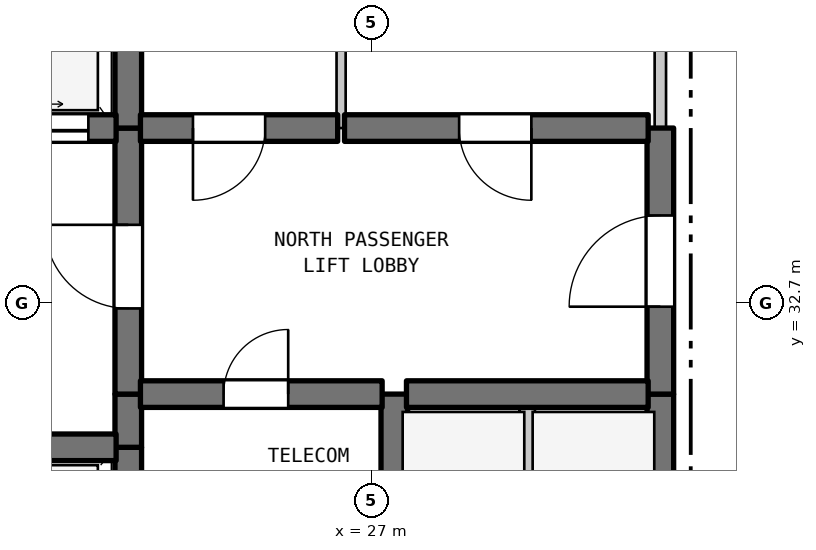
"""IFC4 building model, lengths in metres.
Left out: names, types, materials, properties, quantities, classifications, styles, units other than length and angle.
Written with IfcOpenShell. Run it as: python <this file> out.ifc"""

import sys

from ifc_helpers import new_model, si_unit, direction, frame, frame_2d, origin, place, context, subcontext, project, spatial, rectangle, extrude, element, fill, save


model = new_model("IFC4")
c1 = context("Model", 3, precision=1e-05, world=origin(), true_north=direction((0.0, 1.0)))
c2 = subcontext(c1, "Body", "Model", "MODEL_VIEW")
j1 = project(units=[si_unit("LENGTHUNIT", "METRE"), si_unit("PLANEANGLEUNIT", "RADIAN")], contexts=[c1])
p1 = place(None, origin())
s1 = spatial("IfcSite", under=j1, at=p1, CompositionType="ELEMENT")
p2 = place(p1, origin())
s2 = spatial("IfcBuilding", under=s1, at=p2, CompositionType="ELEMENT")
p3 = place(p2, frame((0.0, 0.0, 206.9)))
s3 = spatial("IfcBuildingStorey", under=s2, at=p3, CompositionType="ELEMENT", Elevation=206.9)
p4 = place(p3, frame((23.8, 29.5, 0.0), z_axis=(0.0, 0.0, 1.0), x_axis=(0.0, 1.0, 0.0)))
e1 = element("IfcWall", 1, at=p4, inside=s3, PredefinedType="SHEAR", context=c2, shape_type="SweptSolid", body=[
    extrude(rectangle(XDim=1.3, YDim=0.35, at=frame_2d((0.65, 0.0))), origin(), (0.0, 0.0, 1.0), 3.39),
])
p5 = place(p3, frame((23.8, 30.8, 0.0), z_axis=(0.0, 0.0, 1.0), x_axis=(0.0, 1.0, 0.0)))
e2 = element("IfcWall", 2, at=p5, inside=s3, PredefinedType="SHEAR", context=c2, shape_type="SweptSolid", body=[
    extrude(rectangle(XDim=0.7, YDim=0.35, at=frame_2d((0.35, 0.0))), origin(), (0.0, 0.0, 1.0), 3.39),
])
p6 = place(p3, frame((23.8, 31.5, 0.0), z_axis=(0.0, 0.0, 1.0), x_axis=(0.0, 1.0, 0.0)))
e3 = element("IfcWall", 3, at=p6, inside=s3, PredefinedType="SHEAR", context=c2, shape_type="SweptSolid", body=[
    extrude(rectangle(XDim=3.5, YDim=0.35, at=frame_2d((1.75, 0.0))), origin(), (0.0, 0.0, 1.0), 3.39),
])
p7 = place(p6, frame((1.127, 0.0, 0.0)))
e4 = element("IfcOpeningElement", 4, at=p7, cuts=e3, PredefinedType="OPENING", context=c2, shape_type="SweptSolid", body=[
    extrude(rectangle(XDim=1.1, YDim=2.15, at=frame_2d((0.55, 1.075))), frame((0.0, 0.185, 0.0), z_axis=(0.0, -1.0, 0.0), x_axis=(1.0, 0.0, 0.0)), (0.0, 0.0, 1.0), 0.37),
])
p8 = place(p3, frame((23.8, 35.0, 0.0), z_axis=(0.0, 0.0, 1.0), x_axis=(0.0, 1.0, 0.0)))
e5 = element("IfcWall", 5, at=p8, inside=s3, PredefinedType="SHEAR", context=c2, shape_type="SweptSolid", body=[
    extrude(rectangle(XDim=2.9, YDim=0.35, at=frame_2d((1.45, 0.0))), origin(), (0.0, 0.0, 1.0), 3.39),
])
p9 = place(p3, frame((26.6, 35.0, 0.0), z_axis=(0.0, 0.0, 1.0), x_axis=(0.0, 1.0, 0.0)))
e6 = element("IfcWall", 6, at=p9, inside=s3, PredefinedType="PARTITIONING", context=c2, shape_type="SweptSolid", body=[
    extrude(rectangle(XDim=2.9, YDim=0.12, at=frame_2d((1.45, 0.0))), origin(), (0.0, 0.0, 1.0), 3.39),
])
p10 = place(p3, frame((27.3, 29.5, 0.0), z_axis=(0.0, 0.0, 1.0), x_axis=(0.0, 1.0, 0.0)))
e7 = element("IfcWall", 7, at=p10, inside=s3, PredefinedType="SHEAR", context=c2, shape_type="SweptSolid", body=[
    extrude(rectangle(XDim=2.0, YDim=0.35, at=frame_2d((1.0, 0.0))), origin(), (0.0, 0.0, 1.0), 3.39),
])
p11 = place(p3, frame((29.05, 28.9, 0.0), z_axis=(0.0, 0.0, 1.0), x_axis=(0.0, 1.0, 0.0)))
e8 = element("IfcWall", 8, at=p11, inside=s3, PredefinedType="STANDARD", context=c2, shape_type="SweptSolid", body=[
    extrude(rectangle(XDim=2.6, YDim=0.2, at=frame_2d((1.3, 0.0))), origin(), (0.0, 0.0, 1.0), 3.39),
])
p12 = place(p3, frame((30.8, 28.9, 0.0), z_axis=(0.0, 0.0, 1.0), x_axis=(0.0, 1.0, 0.0)))
e9 = element("IfcWall", 9, at=p12, inside=s3, PredefinedType="SHEAR", context=c2, shape_type="SweptSolid", body=[
    extrude(rectangle(XDim=2.6, YDim=0.35, at=frame_2d((1.3, 0.0))), origin(), (0.0, 0.0, 1.0), 3.39),
])
p13 = place(p3, frame((30.8, 31.5, 0.0), z_axis=(0.0, 0.0, 1.0), x_axis=(0.0, 1.0, 0.0)))
e10 = element("IfcWall", 10, at=p13, inside=s3, PredefinedType="SHEAR", context=c2, shape_type="SweptSolid", body=[
    extrude(rectangle(XDim=3.5, YDim=0.35, at=frame_2d((1.75, 0.0))), origin(), (0.0, 0.0, 1.0), 3.39),
])
p14 = place(p13, frame((1.15, 0.0, 0.0)))
e11 = element("IfcOpeningElement", 11, at=p14, cuts=e10, PredefinedType="OPENING", context=c2, shape_type="SweptSolid", body=[
    extrude(rectangle(XDim=1.2, YDim=2.2, at=frame_2d((0.6, 1.1))), frame((0.0, 0.185, 0.0), z_axis=(0.0, -1.0, 0.0), x_axis=(1.0, 0.0, 0.0)), (0.0, 0.0, 1.0), 0.37),
])
p15 = place(p3, frame((30.8, 35.0, 0.0), z_axis=(0.0, 0.0, 1.0), x_axis=(0.0, 1.0, 0.0)))
e12 = element("IfcWall", 12, at=p15, inside=s3, PredefinedType="STANDARD", context=c2, shape_type="SweptSolid", body=[
    extrude(rectangle(XDim=2.9, YDim=0.15, at=frame_2d((1.45, 0.0))), origin(), (0.0, 0.0, 1.0), 3.39),
])
p16 = place(p3, frame((19.16, 30.8, 0.0), z_axis=(0.0, 0.0, 1.0), x_axis=(1.0, 0.0, 0.0)))
e13 = element("IfcWall", 13, at=p16, inside=s3, PredefinedType="SHEAR", context=c2, shape_type="SweptSolid", body=[
    extrude(rectangle(XDim=4.48, YDim=0.35, at=frame_2d((2.24, 0.0))), origin(), (0.0, 0.0, 1.0), 3.39),
])
p17 = place(p3, frame((23.96, 31.5, 0.0), z_axis=(0.0, 0.0, 1.0), x_axis=(1.0, 0.0, 0.0)))
e14 = element("IfcWall", 14, at=p17, inside=s3, PredefinedType="SHEAR", context=c2, shape_type="SweptSolid", body=[
    extrude(rectangle(XDim=3.18, YDim=0.35, at=frame_2d((1.59, 0.0))), origin(), (0.0, 0.0, 1.0), 3.39),
])
p18 = place(p17, frame((1.094, 0.0, 0.0)))
e15 = element("IfcOpeningElement", 15, at=p18, cuts=e14, PredefinedType="OPENING", context=c2, shape_type="SweptSolid", body=[
    extrude(rectangle(XDim=0.85, YDim=2.1, at=frame_2d((0.425, 1.05))), frame((0.0, 0.185, 0.0), z_axis=(0.0, -1.0, 0.0), x_axis=(1.0, 0.0, 0.0)), (0.0, 0.0, 1.0), 0.37),
])
p19 = place(p3, frame((27.46, 31.5, 0.0), z_axis=(0.0, 0.0, 1.0), x_axis=(1.0, 0.0, 0.0)))
e16 = element("IfcWall", 16, at=p19, inside=s3, PredefinedType="SHEAR", context=c2, shape_type="SweptSolid", body=[
    extrude(rectangle(XDim=3.18, YDim=0.35, at=frame_2d((1.59, 0.0))), origin(), (0.0, 0.0, 1.0), 3.39),
])
p20 = place(p3, frame((19.16, 35.0, 0.0), z_axis=(0.0, 0.0, 1.0), x_axis=(1.0, 0.0, 0.0)))
e17 = element("IfcWall", 17, at=p20, inside=s3, PredefinedType="SHEAR", context=c2, shape_type="SweptSolid", body=[
    extrude(rectangle(XDim=4.48, YDim=0.35, at=frame_2d((2.24, 0.0))), origin(), (0.0, 0.0, 1.0), 3.39),
])
p21 = place(p20, frame((0.365, 0.0, 0.0)))
e18 = element("IfcOpeningElement", 18, at=p21, cuts=e17, PredefinedType="OPENING", context=c2, shape_type="SweptSolid", body=[
    extrude(rectangle(XDim=1.35, YDim=2.2, at=frame_2d((0.675, 1.1))), frame((0.0, 0.185, 0.0), z_axis=(0.0, -1.0, 0.0), x_axis=(1.0, 0.0, 0.0)), (0.0, 0.0, 1.0), 0.37),
])
p22 = place(p20, frame((2.765, 0.0, 0.0)))
e19 = element("IfcOpeningElement", 19, at=p22, cuts=e17, PredefinedType="OPENING", context=c2, shape_type="SweptSolid", body=[
    extrude(rectangle(XDim=1.35, YDim=2.2, at=frame_2d((0.675, 1.1))), frame((0.0, 0.185, 0.0), z_axis=(0.0, -1.0, 0.0), x_axis=(1.0, 0.0, 0.0)), (0.0, 0.0, 1.0), 0.37),
])
p23 = place(p3, frame((23.96, 35.0, 0.0), z_axis=(0.0, 0.0, 1.0), x_axis=(1.0, 0.0, 0.0)))
e20 = element("IfcWall", 20, at=p23, inside=s3, PredefinedType="SHEAR", context=c2, shape_type="SweptSolid", body=[
    extrude(rectangle(XDim=2.595, YDim=0.35, at=frame_2d((1.297, 0.0))), origin(), (0.0, 0.0, 1.0), 3.39),
])
p24 = place(p23, frame((0.691, 0.0, 0.0)))
e21 = element("IfcOpeningElement", 21, at=p24, cuts=e20, PredefinedType="OPENING", context=c2, shape_type="SweptSolid", body=[
    extrude(rectangle(XDim=0.95, YDim=2.15, at=frame_2d((0.475, 1.075))), frame((0.0, 0.185, 0.0), z_axis=(0.0, -1.0, 0.0), x_axis=(1.0, 0.0, 0.0)), (0.0, 0.0, 1.0), 0.37),
])
p25 = place(p3, frame((26.645, 35.0, 0.0), z_axis=(0.0, 0.0, 1.0), x_axis=(1.0, 0.0, 0.0)))
e22 = element("IfcWall", 22, at=p25, inside=s3, PredefinedType="SHEAR", context=c2, shape_type="SweptSolid", body=[
    extrude(rectangle(XDim=3.995, YDim=0.35, at=frame_2d((1.998, 0.0))), origin(), (0.0, 0.0, 1.0), 3.39),
])
p26 = place(p25, frame((1.508, 0.0, 0.0)))
e23 = element("IfcOpeningElement", 23, at=p26, cuts=e22, PredefinedType="OPENING", context=c2, shape_type="SweptSolid", body=[
    extrude(rectangle(XDim=0.95, YDim=2.15, at=frame_2d((0.475, 1.075))), frame((0.0, 0.185, 0.0), z_axis=(0.0, -1.0, 0.0), x_axis=(1.0, 0.0, 0.0)), (0.0, 0.0, 1.0), 0.37),
])
p27 = place(p7, origin())
e24 = element("IfcDoor", 24, at=p27, inside=s3, OperationType="SINGLE_SWING_RIGHT", PredefinedType="DOOR", context=c2, shape_type="SweptSolid", body=[
    extrude(rectangle(XDim=1.1, YDim=2.15, at=frame_2d((0.55, 1.075))), frame((0.0, 0.025, 0.0), z_axis=(0.0, -1.0, 0.0), x_axis=(1.0, 0.0, 0.0)), (0.0, 0.0, 1.0), 0.05),
])
fill(e4, e24)
p28 = place(p14, origin())
e25 = element("IfcDoor", 25, at=p28, inside=s3, OperationType="SINGLE_SWING_LEFT", PredefinedType="DOOR", context=c2, shape_type="SweptSolid", body=[
    extrude(rectangle(XDim=1.2, YDim=2.2, at=frame_2d((0.6, 1.1))), frame((0.0, 0.025, 0.0), z_axis=(0.0, -1.0, 0.0), x_axis=(1.0, 0.0, 0.0)), (0.0, 0.0, 1.0), 0.05),
])
fill(e11, e25)
p29 = place(p18, origin())
e26 = element("IfcDoor", 26, at=p29, inside=s3, OperationType="SINGLE_SWING_RIGHT", PredefinedType="DOOR", context=c2, shape_type="SweptSolid", body=[
    extrude(rectangle(XDim=0.85, YDim=2.1, at=frame_2d((0.425, 1.05))), frame((0.0, 0.025, 0.0), z_axis=(0.0, -1.0, 0.0), x_axis=(1.0, 0.0, 0.0)), (0.0, 0.0, 1.0), 0.05),
])
fill(e15, e26)
p30 = place(p22, origin())
e27 = element("IfcDoor", 27, at=p30, inside=s3, OperationType="DOUBLE_DOOR_SLIDING", PredefinedType="DOOR", context=c2, shape_type="SweptSolid", body=[
    extrude(rectangle(XDim=1.35, YDim=2.2, at=frame_2d((0.675, 1.1))), frame((0.0, 0.025, 0.0), z_axis=(0.0, -1.0, 0.0), x_axis=(1.0, 0.0, 0.0)), (0.0, 0.0, 1.0), 0.05),
])
fill(e19, e27)
p31 = place(p24, frame((0.95, 0.0, 0.0), z_axis=(0.0, 0.0, 1.0), x_axis=(-1.0, 0.0, 0.0)))
e28 = element("IfcDoor", 28, at=p31, inside=s3, OperationType="SINGLE_SWING_LEFT", PredefinedType="DOOR", context=c2, shape_type="SweptSolid", body=[
    extrude(rectangle(XDim=0.95, YDim=2.15, at=frame_2d((0.475, 1.075))), frame((0.0, 0.025, 0.0), z_axis=(0.0, -1.0, 0.0), x_axis=(1.0, 0.0, 0.0)), (0.0, 0.0, 1.0), 0.05),
])
fill(e21, e28)
p32 = place(p26, frame((0.95, 0.0, 0.0), z_axis=(0.0, 0.0, 1.0), x_axis=(-1.0, 0.0, 0.0)))
e29 = element("IfcDoor", 29, at=p32, inside=s3, OperationType="SINGLE_SWING_RIGHT", PredefinedType="DOOR", context=c2, shape_type="SweptSolid", body=[
    extrude(rectangle(XDim=0.95, YDim=2.15, at=frame_2d((0.475, 1.075))), frame((0.0, 0.025, 0.0), z_axis=(0.0, -1.0, 0.0), x_axis=(1.0, 0.0, 0.0)), (0.0, 0.0, 1.0), 0.05),
])
fill(e23, e29)
save(model, sys.argv[1])
